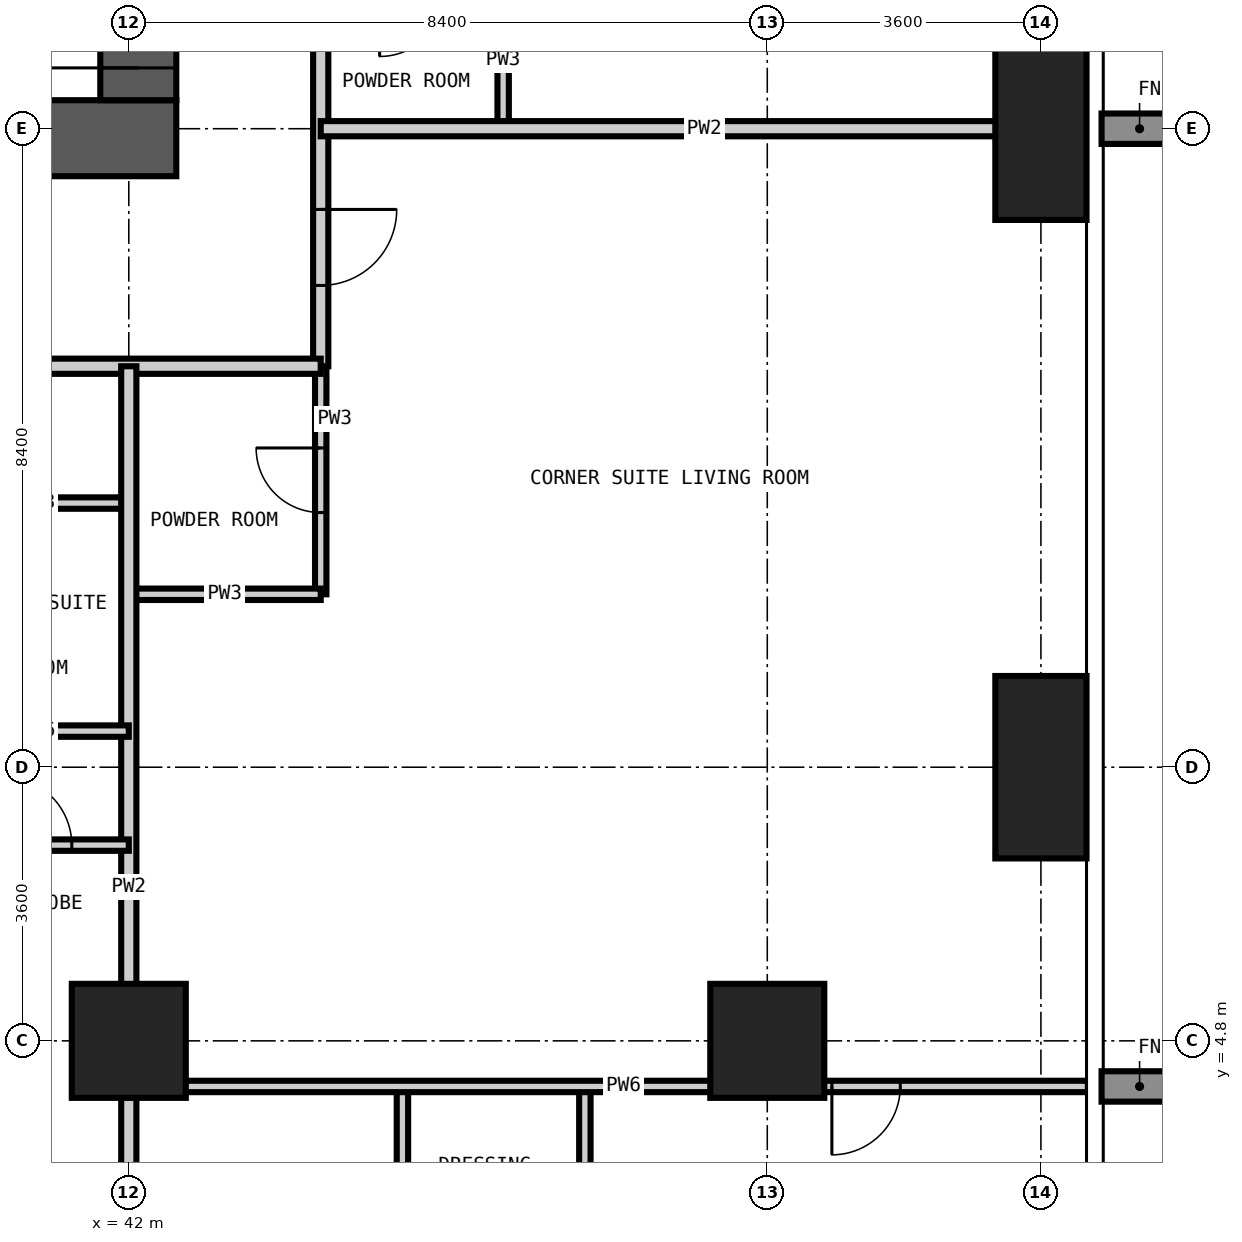
"""IFC4 building model, lengths in metres.
Left out: names, types, materials, properties, quantities, classifications, styles, units other than length and angle.
Written with IfcOpenShell. Run it as: python <this file> out.ifc"""

import sys

from ifc_helpers import new_model, si_unit, direction, frame, frame_2d, origin, origin_2d, place, context, subcontext, project, spatial, rectangle, extrude, element, fill, save


model = new_model("IFC4")
c1 = context("Model", 3, precision=1e-05, world=origin(), true_north=direction((0.0, 1.0)))
c2 = subcontext(c1, "Body", "Model", "MODEL_VIEW")
j1 = project(units=[si_unit("LENGTHUNIT", "METRE"), si_unit("PLANEANGLEUNIT", "RADIAN")], contexts=[c1])
p1 = place(None, origin())
s1 = spatial("IfcSite", under=j1, at=p1, CompositionType="ELEMENT")
p2 = place(p1, origin())
s2 = spatial("IfcBuilding", under=s1, at=p2, CompositionType="ELEMENT")
p3 = place(p2, frame((0.0, 0.0, 122.4)))
s3 = spatial("IfcBuildingStorey", under=s2, at=p3, CompositionType="ELEMENT", Elevation=122.4)
for number, where, z_axis, x_axis in (
    (1, (42.0, 4.8, -0.35), (0.0, 0.0, 1.0), (1.0, 0.0, 0.0)),
    (2, (50.4, 4.8, -0.35), (0.0, 0.0, 1.0), (1.0, 0.0, 0.0)),
):
    element("IfcColumn", number, at=place(p3, frame(where, z_axis=z_axis, x_axis=x_axis)), inside=s3, PredefinedType="COLUMN", context=c2, shape_type="SweptSolid", body=[
        extrude(rectangle(XDim=1.5, YDim=1.5, at=origin_2d()), origin(), (0.0, 0.0, 1.0), 3.6),
    ])
for number, where, z_axis, x_axis in (
    (3, (54.0, 8.4, -0.35), (0.0, 0.0, 1.0), (1.0, 0.0, 0.0)),
    (4, (54.0, 16.8, -0.35), (0.0, 0.0, 1.0), (1.0, 0.0, 0.0)),
):
    element("IfcColumn", number, at=place(p3, frame(where, z_axis=z_axis, x_axis=x_axis)), inside=s3, PredefinedType="COLUMN", context=c2, shape_type="SweptSolid", body=[
        extrude(rectangle(XDim=1.2, YDim=2.4, at=origin_2d()), origin(), (0.0, 0.0, 1.0), 3.6),
    ])
p4 = place(p3, frame((16.175, 16.675, -0.35), z_axis=(0.0, 0.0, 1.0), x_axis=(1.0, 0.0, 0.0)))
e5 = element("IfcWall", 5, at=p4, inside=s3, PredefinedType="SHEAR", context=c2, shape_type="SweptSolid", body=[
    extrude(rectangle(XDim=26.45, YDim=1.0, at=frame_2d((13.225, 0.0))), origin(), (0.0, 0.0, 1.0), 3.6),
])
p5 = place(p4, frame((12.725, 0.0, 0.35)))
e6 = element("IfcOpeningElement", 6, at=p5, cuts=e5, PredefinedType="OPENING", context=c2, shape_type="SweptSolid", body=[
    extrude(rectangle(XDim=1.0, YDim=2.1, at=frame_2d((0.5, 1.05))), frame((0.0, 0.51, 0.0), z_axis=(0.0, -1.0, 0.0), x_axis=(1.0, 0.0, 0.0)), (0.0, 0.0, 1.0), 1.02),
])
p6 = place(p4, frame((19.025, 0.0, 0.35)))
e7 = element("IfcOpeningElement", 7, at=p6, cuts=e5, PredefinedType="OPENING", context=c2, shape_type="SweptSolid", body=[
    extrude(rectangle(XDim=1.0, YDim=2.1, at=frame_2d((0.5, 1.05))), frame((0.0, 0.51, 0.0), z_axis=(0.0, -1.0, 0.0), x_axis=(1.0, 0.0, 0.0)), (0.0, 0.0, 1.0), 1.02),
])
p7 = place(p3, frame((42.125, 17.175, -0.35), z_axis=(0.0, 0.0, 1.0), x_axis=(0.0, 1.0, 0.0)))
e8 = element("IfcWall", 8, at=p7, inside=s3, PredefinedType="SHEAR", context=c2, shape_type="SweptSolid", body=[
    extrude(rectangle(XDim=24.45, YDim=1.0, at=frame_2d((12.225, 0.0))), origin(), (0.0, 0.0, 1.0), 3.6),
])
p8 = place(p7, frame((0.425, 0.0, 0.35)))
e9 = element("IfcOpeningElement", 9, at=p8, cuts=e8, PredefinedType="OPENING", context=c2, shape_type="SweptSolid", body=[
    extrude(rectangle(XDim=1.2, YDim=2.2, at=frame_2d((0.6, 1.1))), frame((0.0, 0.51, 0.0), z_axis=(0.0, -1.0, 0.0), x_axis=(1.0, 0.0, 0.0)), (0.0, 0.0, 1.0), 1.02),
])
p9 = place(p7, frame((11.325, 0.0, 0.35)))
e10 = element("IfcOpeningElement", 10, at=p9, cuts=e8, PredefinedType="OPENING", context=c2, shape_type="SweptSolid", body=[
    extrude(rectangle(XDim=1.8, YDim=2.2, at=frame_2d((0.9, 1.1))), frame((0.0, 0.51, 0.0), z_axis=(0.0, -1.0, 0.0), x_axis=(1.0, 0.0, 0.0)), (0.0, 0.0, 1.0), 1.02),
])
p10 = place(p7, frame((20.125, 0.0, 0.35)))
e11 = element("IfcOpeningElement", 11, at=p10, cuts=e8, PredefinedType="OPENING", context=c2, shape_type="SweptSolid", body=[
    extrude(rectangle(XDim=1.0, YDim=2.1, at=frame_2d((0.5, 1.05))), frame((0.0, 0.51, 0.0), z_axis=(0.0, -1.0, 0.0), x_axis=(1.0, 0.0, 0.0)), (0.0, 0.0, 1.0), 1.02),
])
p11 = place(p3, frame((44.525, 10.675, 0.0), z_axis=(0.0, 0.0, 1.0), x_axis=(0.0, 1.0, 0.0)))
e12 = element("IfcWall", 12, at=p11, inside=s3, PredefinedType="PARTITIONING", context=c2, shape_type="SweptSolid", body=[
    extrude(rectangle(XDim=3.0, YDim=0.15, at=frame_2d((1.5, 0.0))), origin(), (0.0, 0.0, 1.0), 3.25),
])
p12 = place(p11, frame((1.075, 0.0, 0.0)))
e13 = element("IfcOpeningElement", 13, at=p12, cuts=e12, PredefinedType="OPENING", context=c2, shape_type="SweptSolid", body=[
    extrude(rectangle(XDim=0.85, YDim=2.1, at=frame_2d((0.425, 1.05))), frame((0.0, 0.085, 0.0), z_axis=(0.0, -1.0, 0.0), x_axis=(1.0, 0.0, 0.0)), (0.0, 0.0, 1.0), 0.17),
])
p13 = place(p3, frame((46.925, 16.8, 0.0), z_axis=(0.0, 0.0, 1.0), x_axis=(0.0, 1.0, 0.0)))
e14 = element("IfcWall", 14, at=p13, inside=s3, PredefinedType="PARTITIONING", context=c2, shape_type="SweptSolid", body=[
    extrude(rectangle(XDim=1.8, YDim=0.15, at=frame_2d((0.9, 0.0))), origin(), (0.0, 0.0, 1.0), 3.25),
])
p14 = place(p3, frame((42.0, 10.675, 0.0), z_axis=(0.0, 0.0, 1.0), x_axis=(1.0, 0.0, 0.0)))
e15 = element("IfcWall", 15, at=p14, inside=s3, PredefinedType="PARTITIONING", context=c2, shape_type="SweptSolid", body=[
    extrude(rectangle(XDim=2.525, YDim=0.15, at=frame_2d((1.262, 0.0))), origin(), (0.0, 0.0, 1.0), 3.25),
])
p15 = place(p3, frame((39.6, 11.875, 0.0), z_axis=(0.0, 0.0, 1.0), x_axis=(1.0, 0.0, 0.0)))
e16 = element("IfcWall", 16, at=p15, inside=s3, PredefinedType="PARTITIONING", context=c2, shape_type="SweptSolid", body=[
    extrude(rectangle(XDim=2.4, YDim=0.15, at=frame_2d((1.2, 0.0))), origin(), (0.0, 0.0, 1.0), 3.25),
])
p16 = place(p3, frame((44.525, 45.725, 0.0), z_axis=(0.0, 0.0, 1.0), x_axis=(0.0, -1.0, 0.0)))
e17 = element("IfcWall", 17, at=p16, inside=s3, PredefinedType="PARTITIONING", context=c2, shape_type="SweptSolid", body=[
    extrude(rectangle(XDim=32.05, YDim=0.2, at=frame_2d((16.025, 0.0))), origin(), (0.0, 0.0, 1.0), 3.25),
])
p17 = place(p16, frame((25.425, 0.0, 0.0)))
e18 = element("IfcOpeningElement", 18, at=p17, cuts=e17, PredefinedType="OPENING", context=c2, shape_type="SweptSolid", body=[
    extrude(rectangle(XDim=1.0, YDim=2.2, at=frame_2d((0.5, 1.1))), frame((0.0, 0.11, 0.0), z_axis=(0.0, -1.0, 0.0), x_axis=(1.0, 0.0, 0.0)), (0.0, 0.0, 1.0), 0.22),
])
p18 = place(p16, frame((14.625, 0.0, 0.0)))
e19 = element("IfcOpeningElement", 19, at=p18, cuts=e17, PredefinedType="OPENING", context=c2, shape_type="SweptSolid", body=[
    extrude(rectangle(XDim=1.0, YDim=2.2, at=frame_2d((0.5, 1.1))), frame((0.0, 0.11, 0.0), z_axis=(0.0, -1.0, 0.0), x_axis=(1.0, 0.0, 0.0)), (0.0, 0.0, 1.0), 0.22),
])
p19 = place(p16, frame((8.625, 0.0, 0.0)))
e20 = element("IfcOpeningElement", 20, at=p19, cuts=e17, PredefinedType="OPENING", context=c2, shape_type="SweptSolid", body=[
    extrude(rectangle(XDim=1.0, YDim=2.2, at=frame_2d((0.5, 1.1))), frame((0.0, 0.11, 0.0), z_axis=(0.0, -1.0, 0.0), x_axis=(1.0, 0.0, 0.0)), (0.0, 0.0, 1.0), 0.22),
])
p20 = place(p16, frame((29.987, 0.0, 0.0)))
e21 = element("IfcOpeningElement", 21, at=p20, cuts=e17, PredefinedType="OPENING", context=c2, shape_type="SweptSolid", body=[
    extrude(rectangle(XDim=1.0, YDim=2.2, at=frame_2d((0.5, 1.1))), frame((0.0, 0.11, 0.0), z_axis=(0.0, -1.0, 0.0), x_axis=(1.0, 0.0, 0.0)), (0.0, 0.0, 1.0), 0.22),
])
p21 = place(p16, frame((1.363, 0.0, 0.0)))
e22 = element("IfcOpeningElement", 22, at=p21, cuts=e17, PredefinedType="OPENING", context=c2, shape_type="SweptSolid", body=[
    extrude(rectangle(XDim=1.0, YDim=2.2, at=frame_2d((0.5, 1.1))), frame((0.0, 0.11, 0.0), z_axis=(0.0, -1.0, 0.0), x_axis=(1.0, 0.0, 0.0)), (0.0, 0.0, 1.0), 0.22),
])
p22 = place(p3, frame((44.525, 13.675, 0.0), z_axis=(0.0, 0.0, 1.0), x_axis=(-1.0, 0.0, 0.0)))
e23 = element("IfcWall", 23, at=p22, inside=s3, PredefinedType="PARTITIONING", context=c2, shape_type="SweptSolid", body=[
    extrude(rectangle(XDim=31.925, YDim=0.2, at=frame_2d((15.962, 0.0))), origin(), (0.0, 0.0, 1.0), 3.25),
])
p23 = place(p22, frame((25.125, 0.0, 0.0)))
e24 = element("IfcOpeningElement", 24, at=p23, cuts=e23, PredefinedType="OPENING", context=c2, shape_type="SweptSolid", body=[
    extrude(rectangle(XDim=1.0, YDim=2.2, at=frame_2d((0.5, 1.1))), frame((0.0, 0.11, 0.0), z_axis=(0.0, -1.0, 0.0), x_axis=(1.0, 0.0, 0.0)), (0.0, 0.0, 1.0), 0.22),
])
p24 = place(p22, frame((18.825, 0.0, 0.0)))
e25 = element("IfcOpeningElement", 25, at=p24, cuts=e23, PredefinedType="OPENING", context=c2, shape_type="SweptSolid", body=[
    extrude(rectangle(XDim=1.0, YDim=2.2, at=frame_2d((0.5, 1.1))), frame((0.0, 0.11, 0.0), z_axis=(0.0, -1.0, 0.0), x_axis=(1.0, 0.0, 0.0)), (0.0, 0.0, 1.0), 0.22),
])
p25 = place(p22, frame((10.425, 0.0, 0.0)))
e26 = element("IfcOpeningElement", 26, at=p25, cuts=e23, PredefinedType="OPENING", context=c2, shape_type="SweptSolid", body=[
    extrude(rectangle(XDim=1.0, YDim=2.2, at=frame_2d((0.5, 1.1))), frame((0.0, 0.11, 0.0), z_axis=(0.0, -1.0, 0.0), x_axis=(1.0, 0.0, 0.0)), (0.0, 0.0, 1.0), 0.22),
])
p26 = place(p22, frame((4.125, 0.0, 0.0)))
e27 = element("IfcOpeningElement", 27, at=p26, cuts=e23, PredefinedType="OPENING", context=c2, shape_type="SweptSolid", body=[
    extrude(rectangle(XDim=1.0, YDim=2.2, at=frame_2d((0.5, 1.1))), frame((0.0, 0.11, 0.0), z_axis=(0.0, -1.0, 0.0), x_axis=(1.0, 0.0, 0.0)), (0.0, 0.0, 1.0), 0.22),
])
p27 = place(p3, frame((42.0, -0.018, 0.0), z_axis=(0.0, 0.0, 1.0), x_axis=(0.0, 1.0, 0.0)))
e28 = element("IfcWall", 28, at=p27, inside=s3, PredefinedType="PARTITIONING", context=c2, shape_type="SweptSolid", body=[
    extrude(rectangle(XDim=13.693, YDim=0.2, at=frame_2d((6.847, 0.0))), origin(), (0.0, 0.0, 1.0), 3.25),
])
p28 = place(p3, frame((44.525, 16.8, 0.0), z_axis=(0.0, 0.0, 1.0), x_axis=(1.0, 0.0, 0.0)))
e29 = element("IfcWall", 29, at=p28, inside=s3, PredefinedType="PARTITIONING", context=c2, shape_type="SweptSolid", body=[
    extrude(rectangle(XDim=10.093, YDim=0.2, at=frame_2d((5.046, 0.0))), origin(), (0.0, 0.0, 1.0), 3.25),
])
p29 = place(p3, frame((45.6, 1.2, 0.0), z_axis=(0.0, 0.0, 1.0), x_axis=(0.0, 1.0, 0.0)))
e30 = element("IfcWall", 30, at=p29, inside=s3, PredefinedType="PARTITIONING", context=c2, shape_type="SweptSolid", body=[
    extrude(rectangle(XDim=3.0, YDim=0.15, at=frame_2d((1.5, 0.0))), origin(), (0.0, 0.0, 1.0), 3.25),
])
p30 = place(p3, frame((48.0, 1.2, 0.0), z_axis=(0.0, 0.0, 1.0), x_axis=(0.0, 1.0, 0.0)))
e31 = element("IfcWall", 31, at=p30, inside=s3, PredefinedType="PARTITIONING", context=c2, shape_type="SweptSolid", body=[
    extrude(rectangle(XDim=3.0, YDim=0.15, at=frame_2d((1.5, 0.0))), origin(), (0.0, 0.0, 1.0), 3.25),
])
p31 = place(p30, frame((1.05, 0.0, 0.0)))
e32 = element("IfcOpeningElement", 32, at=p31, cuts=e31, PredefinedType="OPENING", context=c2, shape_type="SweptSolid", body=[
    extrude(rectangle(XDim=0.9, YDim=2.1, at=frame_2d((0.45, 1.05))), frame((0.0, 0.085, 0.0), z_axis=(0.0, -1.0, 0.0), x_axis=(1.0, 0.0, 0.0)), (0.0, 0.0, 1.0), 0.17),
])
p32 = place(p3, frame((42.0, 4.2, 0.0), z_axis=(0.0, 0.0, 1.0), x_axis=(1.0, 0.0, 0.0)))
e33 = element("IfcWall", 33, at=p32, inside=s3, PredefinedType="PARTITIONING", context=c2, shape_type="SweptSolid", body=[
    extrude(rectangle(XDim=12.618, YDim=0.15, at=frame_2d((6.309, 0.0))), origin(), (0.0, 0.0, 1.0), 3.25),
])
p33 = place(p32, frame((9.25, 0.0, 0.0)))
e34 = element("IfcOpeningElement", 34, at=p33, cuts=e33, PredefinedType="OPENING", context=c2, shape_type="SweptSolid", body=[
    extrude(rectangle(XDim=0.9, YDim=2.1, at=frame_2d((0.45, 1.05))), frame((0.0, 0.085, 0.0), z_axis=(0.0, -1.0, 0.0), x_axis=(1.0, 0.0, 0.0)), (0.0, 0.0, 1.0), 0.17),
])
p34 = place(p3, frame((39.6, 7.375, 0.0), z_axis=(0.0, 0.0, 1.0), x_axis=(1.0, 0.0, 0.0)))
e35 = element("IfcWall", 35, at=p34, inside=s3, PredefinedType="PARTITIONING", context=c2, shape_type="SweptSolid", body=[
    extrude(rectangle(XDim=2.4, YDim=0.15, at=frame_2d((1.2, 0.0))), origin(), (0.0, 0.0, 1.0), 3.25),
])
p35 = place(p34, frame((0.75, 0.0, 0.0)))
e36 = element("IfcOpeningElement", 36, at=p35, cuts=e35, PredefinedType="OPENING", context=c2, shape_type="SweptSolid", body=[
    extrude(rectangle(XDim=0.9, YDim=2.1, at=frame_2d((0.45, 1.05))), frame((0.0, 0.085, 0.0), z_axis=(0.0, -1.0, 0.0), x_axis=(1.0, 0.0, 0.0)), (0.0, 0.0, 1.0), 0.17),
])
p36 = place(p3, frame((39.6, 8.875, 0.0), z_axis=(0.0, 0.0, 1.0), x_axis=(1.0, 0.0, 0.0)))
e37 = element("IfcWall", 37, at=p36, inside=s3, PredefinedType="PARTITIONING", context=c2, shape_type="SweptSolid", body=[
    extrude(rectangle(XDim=2.4, YDim=0.15, at=frame_2d((1.2, 0.0))), origin(), (0.0, 0.0, 1.0), 3.25),
])
p37 = place(p8, origin())
e38 = element("IfcDoor", 38, at=p37, inside=s3, OperationType="SINGLE_SWING_LEFT", PredefinedType="DOOR", context=c2, shape_type="SweptSolid", body=[
    extrude(rectangle(XDim=1.2, YDim=2.2, at=frame_2d((0.6, 1.1))), frame((0.0, 0.025, 0.0), z_axis=(0.0, -1.0, 0.0), x_axis=(1.0, 0.0, 0.0)), (0.0, 0.0, 1.0), 0.05),
])
fill(e9, e38)
p38 = place(p35, origin())
e39 = element("IfcDoor", 39, at=p38, inside=s3, OperationType="SINGLE_SWING_LEFT", PredefinedType="DOOR", context=c2, shape_type="SweptSolid", body=[
    extrude(rectangle(XDim=0.9, YDim=2.1, at=frame_2d((0.45, 1.05))), frame((0.0, 0.025, 0.0), z_axis=(0.0, -1.0, 0.0), x_axis=(1.0, 0.0, 0.0)), (0.0, 0.0, 1.0), 0.05),
])
fill(e36, e39)
p39 = place(p20, origin())
e40 = element("IfcDoor", 40, at=p39, inside=s3, OperationType="SINGLE_SWING_LEFT", PredefinedType="DOOR", context=c2, shape_type="SweptSolid", body=[
    extrude(rectangle(XDim=1.0, YDim=2.2, at=frame_2d((0.5, 1.1))), frame((0.0, 0.025, 0.0), z_axis=(0.0, -1.0, 0.0), x_axis=(1.0, 0.0, 0.0)), (0.0, 0.0, 1.0), 0.05),
])
fill(e21, e40)
p40 = place(p12, origin())
e41 = element("IfcDoor", 41, at=p40, inside=s3, OperationType="SINGLE_SWING_RIGHT", PredefinedType="DOOR", context=c2, shape_type="SweptSolid", body=[
    extrude(rectangle(XDim=0.85, YDim=2.1, at=frame_2d((0.425, 1.05))), frame((0.0, 0.025, 0.0), z_axis=(0.0, -1.0, 0.0), x_axis=(1.0, 0.0, 0.0)), (0.0, 0.0, 1.0), 0.05),
])
fill(e13, e41)
p41 = place(p33, frame((0.9, 0.0, 0.0), z_axis=(0.0, 0.0, 1.0), x_axis=(-1.0, 0.0, 0.0)))
e42 = element("IfcDoor", 42, at=p41, inside=s3, OperationType="SINGLE_SWING_RIGHT", PredefinedType="DOOR", context=c2, shape_type="SweptSolid", body=[
    extrude(rectangle(XDim=0.9, YDim=2.1, at=frame_2d((0.45, 1.05))), frame((0.0, 0.025, 0.0), z_axis=(0.0, -1.0, 0.0), x_axis=(1.0, 0.0, 0.0)), (0.0, 0.0, 1.0), 0.05),
])
fill(e34, e42)
save(model, sys.argv[1])
